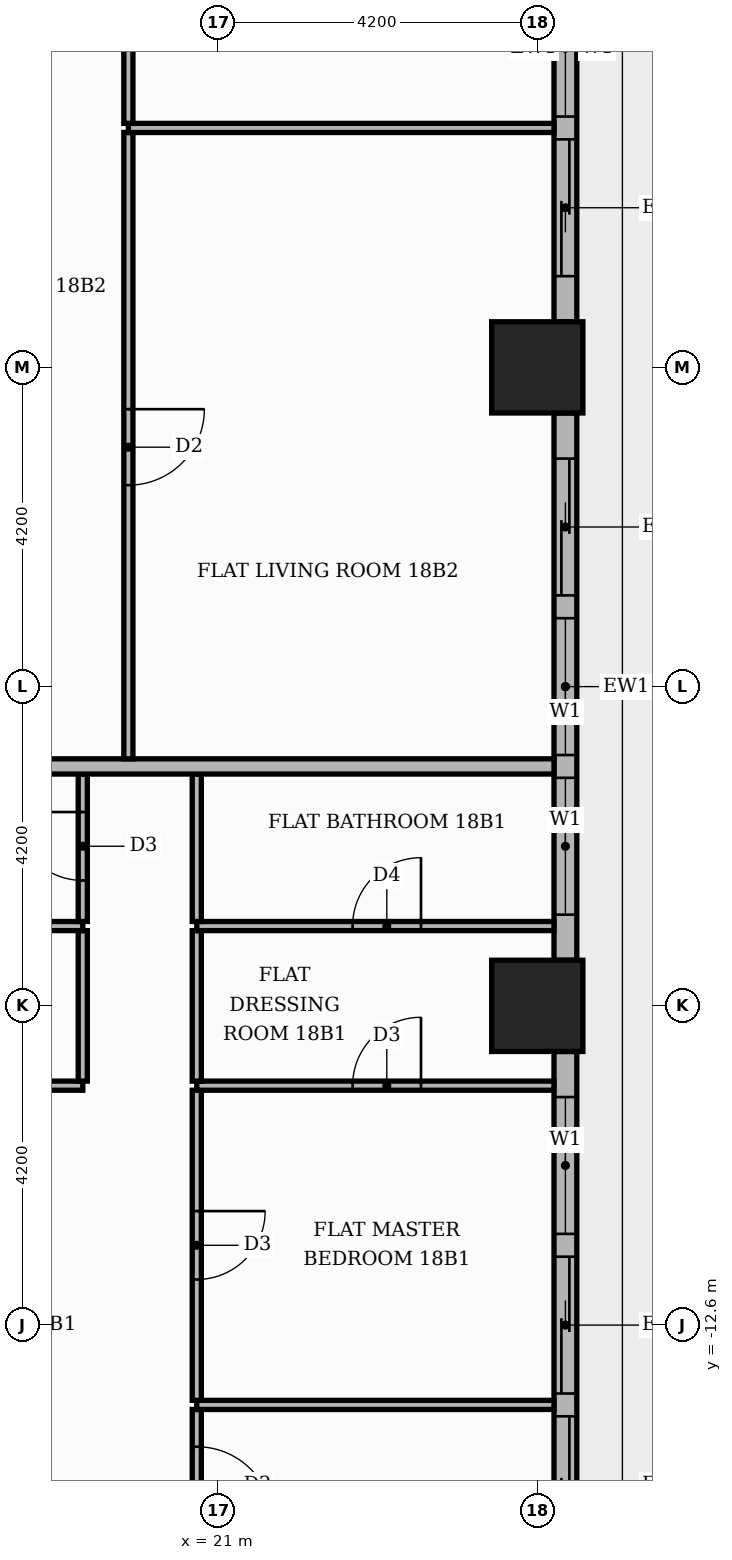
"""IFC4 building model, lengths in metres.
Left out: names, types, materials, properties, quantities, classifications, styles, units other than length and angle.
Written with IfcOpenShell. Run it as: python <this file> out.ifc"""

import sys

from ifc_helpers import new_model, si_unit, direction, frame, frame_2d, origin, origin_2d, place, context, subcontext, project, spatial, rectangle, extrude, element, fill, save


model = new_model("IFC4")
c1 = context("Model", 3, precision=1e-05, world=origin(), true_north=direction((0.0, 1.0)))
c2 = subcontext(c1, "Body", "Model", "MODEL_VIEW")
j1 = project(units=[si_unit("LENGTHUNIT", "METRE"), si_unit("PLANEANGLEUNIT", "RADIAN")], contexts=[c1])
p1 = place(None, origin())
s1 = spatial("IfcSite", under=j1, at=p1, CompositionType="ELEMENT")
p2 = place(p1, origin())
s2 = spatial("IfcBuilding", under=s1, at=p2, CompositionType="ELEMENT")
p3 = place(p2, frame((0.0, 0.0, 79.2)))
s3 = spatial("IfcBuildingStorey", under=s2, at=p3, CompositionType="ELEMENT", Elevation=79.2)
for number, where, z_axis, x_axis in (
    (1, (25.2, 0.0, 0.0), (0.0, 0.0, 1.0), (1.0, 0.0, 0.0)),
    (2, (25.2, -8.4, 0.0), (0.0, 0.0, 1.0), (1.0, 0.0, 0.0)),
):
    element("IfcColumn", number, at=place(p3, frame(where, z_axis=z_axis, x_axis=x_axis)), inside=s3, PredefinedType="COLUMN", context=c2, shape_type="SweptSolid", body=[
        extrude(rectangle(XDim=1.2, YDim=1.2, at=origin_2d()), origin(), (0.0, 0.0, 1.0), 3.9),
    ])
p4 = place(p3, frame((25.57, -16.2, 0.0), z_axis=(0.0, 0.0, 1.0), x_axis=(0.0, 1.0, 0.0)))
e3 = element("IfcWall", 3, at=p4, inside=s3, PredefinedType="STANDARD", context=c2, shape_type="SweptSolid", body=[
    extrude(rectangle(XDim=7.2, YDim=0.3, at=frame_2d((3.6, 0.0))), origin(), (0.0, 0.0, 1.0), 3.48),
])
p5 = place(p4, frame((0.6, 0.0, 0.0)))
e4 = element("IfcOpeningElement", 4, at=p5, cuts=e3, PredefinedType="OPENING", context=c2, shape_type="SweptSolid", body=[
    extrude(rectangle(XDim=1.8, YDim=2.4, at=frame_2d((0.9, 1.2))), frame((0.0, 0.16, 0.0), z_axis=(0.0, -1.0, 0.0), x_axis=(1.0, 0.0, 0.0)), (0.0, 0.0, 1.0), 0.32),
])
p6 = place(p4, frame((2.7, 0.0, 0.0)))
e5 = element("IfcOpeningElement", 5, at=p6, cuts=e3, PredefinedType="OPENING", context=c2, shape_type="SweptSolid", body=[
    extrude(rectangle(XDim=1.8, YDim=2.4, at=frame_2d((0.9, 1.2))), frame((0.0, 0.16, 0.0), z_axis=(0.0, -1.0, 0.0), x_axis=(1.0, 0.0, 0.0)), (0.0, 0.0, 1.0), 0.32),
])
p7 = place(p4, frame((4.8, 0.0, 0.9)))
e6 = element("IfcOpeningElement", 6, at=p7, cuts=e3, PredefinedType="OPENING", context=c2, shape_type="SweptSolid", body=[
    extrude(rectangle(XDim=1.8, YDim=2.1, at=frame_2d((0.9, 1.05))), frame((0.0, 0.16, 0.0), z_axis=(0.0, -1.0, 0.0), x_axis=(1.0, 0.0, 0.0)), (0.0, 0.0, 1.0), 0.32),
])
p8 = place(p3, frame((25.57, -7.8, 0.0), z_axis=(0.0, 0.0, 1.0), x_axis=(0.0, 1.0, 0.0)))
e7 = element("IfcWall", 7, at=p8, inside=s3, PredefinedType="STANDARD", context=c2, shape_type="SweptSolid", body=[
    extrude(rectangle(XDim=7.2, YDim=0.3, at=frame_2d((3.6, 0.0))), origin(), (0.0, 0.0, 1.0), 3.48),
])
p9 = place(p8, frame((0.6, 0.0, 0.9)))
e8 = element("IfcOpeningElement", 8, at=p9, cuts=e7, PredefinedType="OPENING", context=c2, shape_type="SweptSolid", body=[
    extrude(rectangle(XDim=1.8, YDim=2.1, at=frame_2d((0.9, 1.05))), frame((0.0, 0.16, 0.0), z_axis=(0.0, -1.0, 0.0), x_axis=(1.0, 0.0, 0.0)), (0.0, 0.0, 1.0), 0.32),
])
p10 = place(p8, frame((2.7, 0.0, 0.9)))
e9 = element("IfcOpeningElement", 9, at=p10, cuts=e7, PredefinedType="OPENING", context=c2, shape_type="SweptSolid", body=[
    extrude(rectangle(XDim=1.8, YDim=2.1, at=frame_2d((0.9, 1.05))), frame((0.0, 0.16, 0.0), z_axis=(0.0, -1.0, 0.0), x_axis=(1.0, 0.0, 0.0)), (0.0, 0.0, 1.0), 0.32),
])
p11 = place(p8, frame((4.8, 0.0, 0.0)))
e10 = element("IfcOpeningElement", 10, at=p11, cuts=e7, PredefinedType="OPENING", context=c2, shape_type="SweptSolid", body=[
    extrude(rectangle(XDim=1.8, YDim=2.4, at=frame_2d((0.9, 1.2))), frame((0.0, 0.16, 0.0), z_axis=(0.0, -1.0, 0.0), x_axis=(1.0, 0.0, 0.0)), (0.0, 0.0, 1.0), 0.32),
])
p12 = place(p3, frame((25.57, 0.6, 0.0), z_axis=(0.0, 0.0, 1.0), x_axis=(0.0, 1.0, 0.0)))
e11 = element("IfcWall", 11, at=p12, inside=s3, PredefinedType="STANDARD", context=c2, shape_type="SweptSolid", body=[
    extrude(rectangle(XDim=7.2, YDim=0.3, at=frame_2d((3.6, 0.0))), origin(), (0.0, 0.0, 1.0), 3.48),
])
p13 = place(p12, frame((0.6, 0.0, 0.0)))
e12 = element("IfcOpeningElement", 12, at=p13, cuts=e11, PredefinedType="OPENING", context=c2, shape_type="SweptSolid", body=[
    extrude(rectangle(XDim=1.8, YDim=2.4, at=frame_2d((0.9, 1.2))), frame((0.0, 0.16, 0.0), z_axis=(0.0, -1.0, 0.0), x_axis=(1.0, 0.0, 0.0)), (0.0, 0.0, 1.0), 0.32),
])
p14 = place(p12, frame((2.7, 0.0, 0.9)))
e13 = element("IfcOpeningElement", 13, at=p14, cuts=e11, PredefinedType="OPENING", context=c2, shape_type="SweptSolid", body=[
    extrude(rectangle(XDim=1.8, YDim=2.1, at=frame_2d((0.9, 1.05))), frame((0.0, 0.16, 0.0), z_axis=(0.0, -1.0, 0.0), x_axis=(1.0, 0.0, 0.0)), (0.0, 0.0, 1.0), 0.32),
])
p15 = place(p12, frame((4.8, 0.0, 0.0)))
e14 = element("IfcOpeningElement", 14, at=p15, cuts=e11, PredefinedType="OPENING", context=c2, shape_type="SweptSolid", body=[
    extrude(rectangle(XDim=1.8, YDim=2.4, at=frame_2d((0.9, 1.2))), frame((0.0, 0.16, 0.0), z_axis=(0.0, -1.0, 0.0), x_axis=(1.0, 0.0, 0.0)), (0.0, 0.0, 1.0), 0.32),
])
p16 = place(p3, frame((20.72, -15.69, 0.0), z_axis=(0.0, 0.0, 1.0), x_axis=(0.0, 1.0, 0.0)))
e15 = element("IfcWall", 15, at=p16, inside=s3, PredefinedType="PARTITIONING", context=c2, shape_type="SweptSolid", body=[
    extrude(rectangle(XDim=1.98, YDim=0.12, at=frame_2d((0.99, 0.0))), origin(), (0.0, 0.0, 1.0), 3.48),
])
p17 = place(p16, frame((0.49, 0.0, 0.0)))
e16 = element("IfcOpeningElement", 16, at=p17, cuts=e15, PredefinedType="OPENING", context=c2, shape_type="SweptSolid", body=[
    extrude(rectangle(XDim=1.0, YDim=2.1, at=frame_2d((0.5, 1.05))), frame((0.0, 0.07, 0.0), z_axis=(0.0, -1.0, 0.0), x_axis=(1.0, 0.0, 0.0)), (0.0, 0.0, 1.0), 0.14),
])
p18 = place(p3, frame((20.72, -13.65, 0.0), z_axis=(0.0, 0.0, 1.0), x_axis=(1.0, 0.0, 0.0)))
e17 = element("IfcWall", 17, at=p18, inside=s3, PredefinedType="PARTITIONING", context=c2, shape_type="SweptSolid", body=[
    extrude(rectangle(XDim=4.7, YDim=0.12, at=frame_2d((2.35, 0.0))), origin(), (0.0, 0.0, 1.0), 3.48),
])
p19 = place(p3, frame((20.72, -13.59, 0.0), z_axis=(0.0, 0.0, 1.0), x_axis=(0.0, 1.0, 0.0)))
e18 = element("IfcWall", 18, at=p19, inside=s3, PredefinedType="PARTITIONING", context=c2, shape_type="SweptSolid", body=[
    extrude(rectangle(XDim=4.08, YDim=0.12, at=frame_2d((2.04, 0.0))), origin(), (0.0, 0.0, 1.0), 3.48),
])
p20 = place(p19, frame((1.59, 0.0, 0.0)))
e19 = element("IfcOpeningElement", 19, at=p20, cuts=e18, PredefinedType="OPENING", context=c2, shape_type="SweptSolid", body=[
    extrude(rectangle(XDim=0.9, YDim=2.1, at=frame_2d((0.45, 1.05))), frame((0.0, 0.07, 0.0), z_axis=(0.0, -1.0, 0.0), x_axis=(1.0, 0.0, 0.0)), (0.0, 0.0, 1.0), 0.14),
])
p21 = place(p3, frame((13.75, -9.45, 0.0), z_axis=(0.0, 0.0, 1.0), x_axis=(1.0, 0.0, 0.0)))
e20 = element("IfcWall", 20, at=p21, inside=s3, PredefinedType="PARTITIONING", context=c2, shape_type="SweptSolid", body=[
    extrude(rectangle(XDim=5.47, YDim=0.12, at=frame_2d((2.735, 0.0))), origin(), (0.0, 0.0, 1.0), 3.48),
])
p22 = place(p21, frame((2.235, 0.0, 0.0)))
e21 = element("IfcOpeningElement", 21, at=p22, cuts=e20, PredefinedType="OPENING", context=c2, shape_type="SweptSolid", body=[
    extrude(rectangle(XDim=0.9, YDim=2.1, at=frame_2d((0.45, 1.05))), frame((0.0, 0.07, 0.0), z_axis=(0.0, -1.0, 0.0), x_axis=(1.0, 0.0, 0.0)), (0.0, 0.0, 1.0), 0.14),
])
p23 = place(p3, frame((20.72, -9.45, 0.0), z_axis=(0.0, 0.0, 1.0), x_axis=(1.0, 0.0, 0.0)))
e22 = element("IfcWall", 22, at=p23, inside=s3, PredefinedType="PARTITIONING", context=c2, shape_type="SweptSolid", body=[
    extrude(rectangle(XDim=4.7, YDim=0.12, at=frame_2d((2.35, 0.0))), origin(), (0.0, 0.0, 1.0), 3.48),
])
p24 = place(p23, frame((2.05, 0.0, 0.0)))
e23 = element("IfcOpeningElement", 23, at=p24, cuts=e22, PredefinedType="OPENING", context=c2, shape_type="SweptSolid", body=[
    extrude(rectangle(XDim=0.9, YDim=2.1, at=frame_2d((0.45, 1.05))), frame((0.0, 0.07, 0.0), z_axis=(0.0, -1.0, 0.0), x_axis=(1.0, 0.0, 0.0)), (0.0, 0.0, 1.0), 0.14),
])
for number, where, z_axis, x_axis in (
    (24, (19.22, -9.39, 0.0), (0.0, 0.0, 1.0), (0.0, 1.0, 0.0)),
    (25, (20.72, -9.39, 0.0), (0.0, 0.0, 1.0), (0.0, 1.0, 0.0)),
):
    element("IfcWall", number, at=place(p3, frame(where, z_axis=z_axis, x_axis=x_axis)), inside=s3, PredefinedType="PARTITIONING", context=c2, shape_type="SweptSolid", body=[
        extrude(rectangle(XDim=1.98, YDim=0.12, at=frame_2d((0.99, 0.0))), origin(), (0.0, 0.0, 1.0), 3.48),
    ])
p25 = place(p3, frame((13.75, -7.35, 0.0), z_axis=(0.0, 0.0, 1.0), x_axis=(1.0, 0.0, 0.0)))
e26 = element("IfcWall", 26, at=p25, inside=s3, PredefinedType="PARTITIONING", context=c2, shape_type="SweptSolid", body=[
    extrude(rectangle(XDim=5.47, YDim=0.12, at=frame_2d((2.735, 0.0))), origin(), (0.0, 0.0, 1.0), 3.48),
])
p26 = place(p3, frame((20.72, -7.35, 0.0), z_axis=(0.0, 0.0, 1.0), x_axis=(1.0, 0.0, 0.0)))
e27 = element("IfcWall", 27, at=p26, inside=s3, PredefinedType="PARTITIONING", context=c2, shape_type="SweptSolid", body=[
    extrude(rectangle(XDim=4.7, YDim=0.12, at=frame_2d((2.35, 0.0))), origin(), (0.0, 0.0, 1.0), 3.48),
])
p27 = place(p26, frame((2.05, 0.0, 0.0)))
e28 = element("IfcOpeningElement", 28, at=p27, cuts=e27, PredefinedType="OPENING", context=c2, shape_type="SweptSolid", body=[
    extrude(rectangle(XDim=0.9, YDim=2.1, at=frame_2d((0.45, 1.05))), frame((0.0, 0.07, 0.0), z_axis=(0.0, -1.0, 0.0), x_axis=(1.0, 0.0, 0.0)), (0.0, 0.0, 1.0), 0.14),
])
p28 = place(p3, frame((19.22, -7.29, 0.0), z_axis=(0.0, 0.0, 1.0), x_axis=(0.0, 1.0, 0.0)))
e29 = element("IfcWall", 29, at=p28, inside=s3, PredefinedType="PARTITIONING", context=c2, shape_type="SweptSolid", body=[
    extrude(rectangle(XDim=1.94, YDim=0.12, at=frame_2d((0.97, 0.0))), origin(), (0.0, 0.0, 1.0), 3.48),
])
p29 = place(p28, frame((0.54, 0.0, 0.0)))
e30 = element("IfcOpeningElement", 30, at=p29, cuts=e29, PredefinedType="OPENING", context=c2, shape_type="SweptSolid", body=[
    extrude(rectangle(XDim=0.9, YDim=2.1, at=frame_2d((0.45, 1.05))), frame((0.0, 0.07, 0.0), z_axis=(0.0, -1.0, 0.0), x_axis=(1.0, 0.0, 0.0)), (0.0, 0.0, 1.0), 0.14),
])
p30 = place(p3, frame((20.72, -7.29, 0.0), z_axis=(0.0, 0.0, 1.0), x_axis=(0.0, 1.0, 0.0)))
e31 = element("IfcWall", 31, at=p30, inside=s3, PredefinedType="PARTITIONING", context=c2, shape_type="SweptSolid", body=[
    extrude(rectangle(XDim=1.94, YDim=0.12, at=frame_2d((0.97, 0.0))), origin(), (0.0, 0.0, 1.0), 3.48),
])
p31 = place(p3, frame((13.65, -5.25, 0.0), z_axis=(0.0, 0.0, 1.0), x_axis=(1.0, 0.0, 0.0)))
e32 = element("IfcWall", 32, at=p31, inside=s3, PredefinedType="PARTITIONING", context=c2, shape_type="SweptSolid", body=[
    extrude(rectangle(XDim=11.77, YDim=0.2, at=frame_2d((5.885, 0.0))), origin(), (0.0, 0.0, 1.0), 3.48),
])
p32 = place(p3, frame((19.82, -5.15, 0.0), z_axis=(0.0, 0.0, 1.0), x_axis=(0.0, 1.0, 0.0)))
e33 = element("IfcWall", 33, at=p32, inside=s3, PredefinedType="PARTITIONING", context=c2, shape_type="SweptSolid", body=[
    extrude(rectangle(XDim=8.24, YDim=0.12, at=frame_2d((4.12, 0.0))), origin(), (0.0, 0.0, 1.0), 3.48),
])
p33 = place(p32, frame((3.6, 0.0, 0.0)))
e34 = element("IfcOpeningElement", 34, at=p33, cuts=e33, PredefinedType="OPENING", context=c2, shape_type="SweptSolid", body=[
    extrude(rectangle(XDim=1.0, YDim=2.1, at=frame_2d((0.5, 1.05))), frame((0.0, 0.07, 0.0), z_axis=(0.0, -1.0, 0.0), x_axis=(1.0, 0.0, 0.0)), (0.0, 0.0, 1.0), 0.14),
])
p34 = place(p3, frame((19.82, 3.15, 0.0), z_axis=(0.0, 0.0, 1.0), x_axis=(1.0, 0.0, 0.0)))
e35 = element("IfcWall", 35, at=p34, inside=s3, PredefinedType="PARTITIONING", context=c2, shape_type="SweptSolid", body=[
    extrude(rectangle(XDim=5.6, YDim=0.12, at=frame_2d((2.8, 0.0))), origin(), (0.0, 0.0, 1.0), 3.48),
])
p35 = place(p3, frame((19.82, 3.21, 0.0), z_axis=(0.0, 0.0, 1.0), x_axis=(0.0, 1.0, 0.0)))
e36 = element("IfcWall", 36, at=p35, inside=s3, PredefinedType="PARTITIONING", context=c2, shape_type="SweptSolid", body=[
    extrude(rectangle(XDim=6.18, YDim=0.12, at=frame_2d((3.09, 0.0))), origin(), (0.0, 0.0, 1.0), 3.48),
])
p36 = place(p35, frame((2.64, 0.0, 0.0)))
e37 = element("IfcOpeningElement", 37, at=p36, cuts=e36, PredefinedType="OPENING", context=c2, shape_type="SweptSolid", body=[
    extrude(rectangle(XDim=0.9, YDim=2.1, at=frame_2d((0.45, 1.05))), frame((0.0, 0.07, 0.0), z_axis=(0.0, -1.0, 0.0), x_axis=(1.0, 0.0, 0.0)), (0.0, 0.0, 1.0), 0.14),
])
p37 = place(p5, origin())
e38 = element("IfcDoor", 38, at=p37, inside=s3, OperationType="SLIDING_TO_LEFT", PredefinedType="DOOR", context=c2, shape_type="SweptSolid", body=[
    extrude(rectangle(XDim=1.8, YDim=2.4, at=frame_2d((0.9, 1.2))), frame((0.0, 0.025, 0.0), z_axis=(0.0, -1.0, 0.0), x_axis=(1.0, 0.0, 0.0)), (0.0, 0.0, 1.0), 0.05),
])
fill(e4, e38)
p38 = place(p6, origin())
e39 = element("IfcDoor", 39, at=p38, inside=s3, OperationType="SLIDING_TO_RIGHT", PredefinedType="DOOR", context=c2, shape_type="SweptSolid", body=[
    extrude(rectangle(XDim=1.8, YDim=2.4, at=frame_2d((0.9, 1.2))), frame((0.0, 0.025, 0.0), z_axis=(0.0, -1.0, 0.0), x_axis=(1.0, 0.0, 0.0)), (0.0, 0.0, 1.0), 0.05),
])
fill(e5, e39)
p39 = place(p7, origin())
e40 = element("IfcWindow", 40, at=p39, inside=s3, PartitioningType="SINGLE_PANEL", PredefinedType="WINDOW", context=c2, shape_type="SweptSolid", body=[
    extrude(rectangle(XDim=1.8, YDim=2.1, at=frame_2d((0.9, 1.05))), frame((0.0, 0.03, 0.0), z_axis=(0.0, -1.0, 0.0), x_axis=(1.0, 0.0, 0.0)), (0.0, 0.0, 1.0), 0.06),
])
fill(e6, e40)
p40 = place(p9, origin())
e41 = element("IfcWindow", 41, at=p40, inside=s3, PartitioningType="SINGLE_PANEL", PredefinedType="WINDOW", context=c2, shape_type="SweptSolid", body=[
    extrude(rectangle(XDim=1.8, YDim=2.1, at=frame_2d((0.9, 1.05))), frame((0.0, 0.03, 0.0), z_axis=(0.0, -1.0, 0.0), x_axis=(1.0, 0.0, 0.0)), (0.0, 0.0, 1.0), 0.06),
])
fill(e8, e41)
p41 = place(p10, origin())
e42 = element("IfcWindow", 42, at=p41, inside=s3, PartitioningType="SINGLE_PANEL", PredefinedType="WINDOW", context=c2, shape_type="SweptSolid", body=[
    extrude(rectangle(XDim=1.8, YDim=2.1, at=frame_2d((0.9, 1.05))), frame((0.0, 0.03, 0.0), z_axis=(0.0, -1.0, 0.0), x_axis=(1.0, 0.0, 0.0)), (0.0, 0.0, 1.0), 0.06),
])
fill(e9, e42)
p42 = place(p11, origin())
e43 = element("IfcDoor", 43, at=p42, inside=s3, OperationType="SLIDING_TO_RIGHT", PredefinedType="DOOR", context=c2, shape_type="SweptSolid", body=[
    extrude(rectangle(XDim=1.8, YDim=2.4, at=frame_2d((0.9, 1.2))), frame((0.0, 0.025, 0.0), z_axis=(0.0, -1.0, 0.0), x_axis=(1.0, 0.0, 0.0)), (0.0, 0.0, 1.0), 0.05),
])
fill(e10, e43)
p43 = place(p13, origin())
e44 = element("IfcDoor", 44, at=p43, inside=s3, OperationType="SLIDING_TO_LEFT", PredefinedType="DOOR", context=c2, shape_type="SweptSolid", body=[
    extrude(rectangle(XDim=1.8, YDim=2.4, at=frame_2d((0.9, 1.2))), frame((0.0, 0.025, 0.0), z_axis=(0.0, -1.0, 0.0), x_axis=(1.0, 0.0, 0.0)), (0.0, 0.0, 1.0), 0.05),
])
fill(e12, e44)
p44 = place(p14, origin())
e45 = element("IfcWindow", 45, at=p44, inside=s3, PartitioningType="SINGLE_PANEL", PredefinedType="WINDOW", context=c2, shape_type="SweptSolid", body=[
    extrude(rectangle(XDim=1.8, YDim=2.1, at=frame_2d((0.9, 1.05))), frame((0.0, 0.03, 0.0), z_axis=(0.0, -1.0, 0.0), x_axis=(1.0, 0.0, 0.0)), (0.0, 0.0, 1.0), 0.06),
])
fill(e13, e45)
p45 = place(p29, origin())
e46 = element("IfcDoor", 46, at=p45, inside=s3, OperationType="SINGLE_SWING_RIGHT", PredefinedType="DOOR", context=c2, shape_type="SweptSolid", body=[
    extrude(rectangle(XDim=0.9, YDim=2.1, at=frame_2d((0.45, 1.05))), frame((0.0, 0.025, 0.0), z_axis=(0.0, -1.0, 0.0), x_axis=(1.0, 0.0, 0.0)), (0.0, 0.0, 1.0), 0.05),
])
fill(e30, e46)
p46 = place(p17, frame((1.0, 0.0, 0.0), z_axis=(0.0, 0.0, 1.0), x_axis=(-1.0, 0.0, 0.0)))
e47 = element("IfcDoor", 47, at=p46, inside=s3, OperationType="SINGLE_SWING_LEFT", PredefinedType="DOOR", context=c2, shape_type="SweptSolid", body=[
    extrude(rectangle(XDim=1.0, YDim=2.1, at=frame_2d((0.5, 1.05))), frame((0.0, 0.025, 0.0), z_axis=(0.0, -1.0, 0.0), x_axis=(1.0, 0.0, 0.0)), (0.0, 0.0, 1.0), 0.05),
])
fill(e16, e47)
p47 = place(p20, frame((0.9, 0.0, 0.0), z_axis=(0.0, 0.0, 1.0), x_axis=(-1.0, 0.0, 0.0)))
e48 = element("IfcDoor", 48, at=p47, inside=s3, OperationType="SINGLE_SWING_RIGHT", PredefinedType="DOOR", context=c2, shape_type="SweptSolid", body=[
    extrude(rectangle(XDim=0.9, YDim=2.1, at=frame_2d((0.45, 1.05))), frame((0.0, 0.025, 0.0), z_axis=(0.0, -1.0, 0.0), x_axis=(1.0, 0.0, 0.0)), (0.0, 0.0, 1.0), 0.05),
])
fill(e19, e48)
p48 = place(p24, origin())
e49 = element("IfcDoor", 49, at=p48, inside=s3, OperationType="SINGLE_SWING_RIGHT", PredefinedType="DOOR", context=c2, shape_type="SweptSolid", body=[
    extrude(rectangle(XDim=0.9, YDim=2.1, at=frame_2d((0.45, 1.05))), frame((0.0, 0.025, 0.0), z_axis=(0.0, -1.0, 0.0), x_axis=(1.0, 0.0, 0.0)), (0.0, 0.0, 1.0), 0.05),
])
fill(e23, e49)
p49 = place(p27, origin())
e50 = element("IfcDoor", 50, at=p49, inside=s3, OperationType="SINGLE_SWING_RIGHT", PredefinedType="DOOR", context=c2, shape_type="SweptSolid", body=[
    extrude(rectangle(XDim=0.9, YDim=2.1, at=frame_2d((0.45, 1.05))), frame((0.0, 0.025, 0.0), z_axis=(0.0, -1.0, 0.0), x_axis=(1.0, 0.0, 0.0)), (0.0, 0.0, 1.0), 0.05),
])
fill(e28, e50)
p50 = place(p33, frame((1.0, 0.0, 0.0), z_axis=(0.0, 0.0, 1.0), x_axis=(-1.0, 0.0, 0.0)))
e51 = element("IfcDoor", 51, at=p50, inside=s3, OperationType="SINGLE_SWING_RIGHT", PredefinedType="DOOR", context=c2, shape_type="SweptSolid", body=[
    extrude(rectangle(XDim=1.0, YDim=2.1, at=frame_2d((0.5, 1.05))), frame((0.0, 0.025, 0.0), z_axis=(0.0, -1.0, 0.0), x_axis=(1.0, 0.0, 0.0)), (0.0, 0.0, 1.0), 0.05),
])
fill(e34, e51)
save(model, sys.argv[1])
